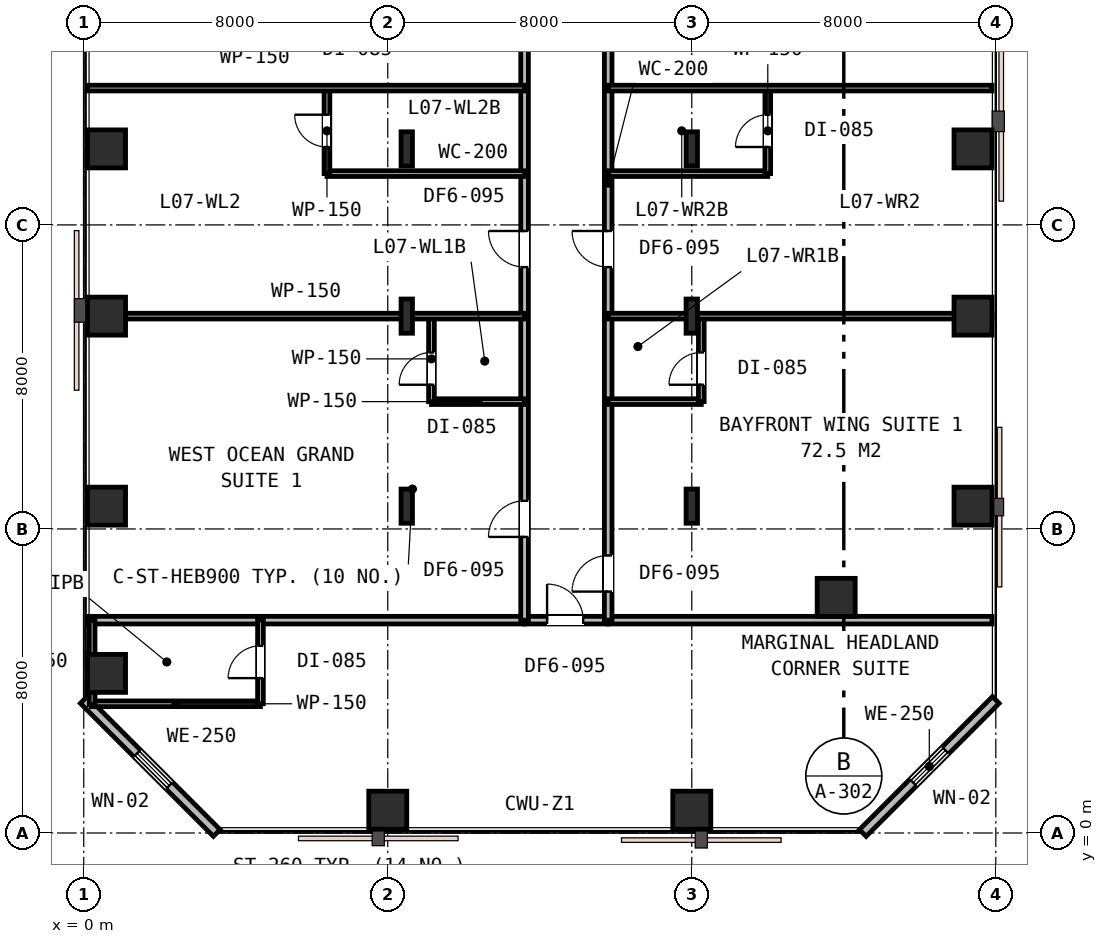
"""IFC4 building model, lengths in metres.
Left out: names, types, materials, properties, quantities, classifications, styles, units other than length and angle.
Written with IfcOpenShell. Run it as: python <this file> out.ifc"""

import sys

from ifc_helpers import new_model, si_unit, direction, frame, frame_2d, origin, origin_2d, place, context, subcontext, project, spatial, rectangle, i_section, extrude, element, fill, save


model = new_model("IFC4")
c1 = context("Model", 3, precision=1e-05, world=origin(), true_north=direction((0.0, 1.0)))
c2 = subcontext(c1, "Body", "Model", "MODEL_VIEW")
j1 = project(units=[si_unit("LENGTHUNIT", "METRE"), si_unit("PLANEANGLEUNIT", "RADIAN")], contexts=[c1])
p1 = place(None, origin())
s1 = spatial("IfcSite", under=j1, at=p1, CompositionType="ELEMENT")
p2 = place(p1, origin())
s2 = spatial("IfcBuilding", under=s1, at=p2, CompositionType="ELEMENT")
p3 = place(p2, frame((0.0, 0.0, 33.0)))
s3 = spatial("IfcBuildingStorey", under=s2, at=p3, CompositionType="ELEMENT", Elevation=33.0)
for number, where, z_axis, x_axis in (
    (1, (0.6, 8.6, 0.0), (0.0, 0.0, 1.0), (1.0, 0.0, 0.0)),
    (2, (0.6, 13.6, 0.0), (0.0, 0.0, 1.0), (1.0, 0.0, 0.0)),
    (3, (0.6, 18.0, 0.0), (0.0, 0.0, 1.0), (1.0, 0.0, 0.0)),
    (4, (0.6, 4.2, 0.0), (0.0, 0.0, 1.0), (1.0, 0.0, 0.0)),
    (5, (8.0, 0.6, 0.0), (0.0, 0.0, 1.0), (1.0, 0.0, 0.0)),
    (6, (16.0, 0.6, 0.0), (0.0, 0.0, 1.0), (1.0, 0.0, 0.0)),
    (7, (19.8, 6.2, 0.0), (0.0, 0.0, 1.0), (1.0, 0.0, 0.0)),
    (8, (23.4, 8.6, 0.0), (0.0, 0.0, 1.0), (1.0, 0.0, 0.0)),
    (9, (23.4, 13.6, 0.0), (0.0, 0.0, 1.0), (1.0, 0.0, 0.0)),
    (10, (23.4, 18.0, 0.0), (0.0, 0.0, 1.0), (1.0, 0.0, 0.0)),
):
    element("IfcColumn", number, at=place(p3, frame(where, z_axis=z_axis, x_axis=x_axis)), inside=s3, PredefinedType="COLUMN", context=c2, shape_type="SweptSolid", body=[
        extrude(rectangle(XDim=1.0, YDim=1.0, at=origin_2d()), origin(), (0.0, 0.0, 1.0), 3.6),
    ])
for number, where, z_axis, x_axis in (
    (11, (8.5, 8.6, 0.0), (0.0, 0.0, 1.0), (1.0, 0.0, 0.0)),
    (12, (16.0, 8.6, 0.0), (0.0, 0.0, 1.0), (1.0, 0.0, 0.0)),
    (13, (8.5, 13.6, 0.0), (0.0, 0.0, 1.0), (1.0, 0.0, 0.0)),
    (14, (16.0, 13.6, 0.0), (0.0, 0.0, 1.0), (1.0, 0.0, 0.0)),
    (15, (8.5, 18.0, 0.0), (0.0, 0.0, 1.0), (1.0, 0.0, 0.0)),
    (16, (16.0, 18.0, 0.0), (0.0, 0.0, 1.0), (1.0, 0.0, 0.0)),
):
    element("IfcColumn", number, at=place(p3, frame(where, z_axis=z_axis, x_axis=x_axis)), inside=s3, PredefinedType="COLUMN", context=c2, shape_type="SweptSolid", body=[
        extrude(i_section(OverallWidth=0.3, OverallDepth=0.9, WebThickness=0.018, FlangeThickness=0.035, FilletRadius=0.03, at=origin_2d()), origin(), (0.0, 0.0, 1.0), 3.6),
    ])
p4 = place(p3, frame((20.5, 0.0, 0.0), z_axis=(0.0, 0.0, 1.0), x_axis=(0.707106781187, 0.707106781187, 0.0)))
e17 = element("IfcWall", 17, at=p4, inside=s3, PredefinedType="STANDARD", context=c2, shape_type="SweptSolid", body=[
    extrude(rectangle(XDim=4.95, YDim=0.25, at=frame_2d((2.475, 0.0))), origin(), (0.0, 0.0, 1.0), 3.33),
])
p5 = place(p4, frame((1.875, 0.0, 0.85)))
e18 = element("IfcOpeningElement", 18, at=p5, cuts=e17, PredefinedType="OPENING", context=c2, shape_type="SweptSolid", body=[
    extrude(rectangle(XDim=1.2, YDim=1.6, at=frame_2d((0.6, 0.8))), frame((0.0, 0.135, 0.0), z_axis=(0.0, -1.0, 0.0), x_axis=(1.0, 0.0, 0.0)), (0.0, 0.0, 1.0), 0.27),
])
p6 = place(p3, frame((0.0, 3.5, 0.0), z_axis=(0.0, 0.0, 1.0), x_axis=(0.707106781187, -0.707106781187, 0.0)))
e19 = element("IfcWall", 19, at=p6, inside=s3, PredefinedType="STANDARD", context=c2, shape_type="SweptSolid", body=[
    extrude(rectangle(XDim=4.95, YDim=0.25, at=frame_2d((2.475, 0.0))), origin(), (0.0, 0.0, 1.0), 3.33),
])
p7 = place(p6, frame((1.985, 0.0, 0.85)))
e20 = element("IfcOpeningElement", 20, at=p7, cuts=e19, PredefinedType="OPENING", context=c2, shape_type="SweptSolid", body=[
    extrude(rectangle(XDim=1.2, YDim=1.6, at=frame_2d((0.6, 0.8))), frame((0.0, 0.135, 0.0), z_axis=(0.0, -1.0, 0.0), x_axis=(1.0, 0.0, 0.0)), (0.0, 0.0, 1.0), 0.27),
])
p8 = place(p3, frame((0.1, 5.6, 0.0), z_axis=(0.0, 0.0, 1.0), x_axis=(1.0, 0.0, 0.0)))
e21 = element("IfcWall", 21, at=p8, inside=s3, PredefinedType="PARTITIONING", context=c2, shape_type="SweptSolid", body=[
    extrude(rectangle(XDim=11.5, YDim=0.2, at=frame_2d((5.75, 0.0))), origin(), (0.0, 0.0, 1.0), 2.87),
])
p9 = place(p3, frame((13.8, 5.6, 0.0), z_axis=(0.0, 0.0, 1.0), x_axis=(1.0, 0.0, 0.0)))
e22 = element("IfcWall", 22, at=p9, inside=s3, PredefinedType="PARTITIONING", context=c2, shape_type="SweptSolid", body=[
    extrude(rectangle(XDim=10.1, YDim=0.2, at=frame_2d((5.05, 0.0))), origin(), (0.0, 0.0, 1.0), 2.68),
])
p10 = place(p3, frame((11.6, 5.6, 0.0), z_axis=(0.0, 0.0, 1.0), x_axis=(1.0, 0.0, 0.0)))
e23 = element("IfcWall", 23, at=p10, inside=s3, PredefinedType="PARTITIONING", context=c2, shape_type="SweptSolid", body=[
    extrude(rectangle(XDim=2.2, YDim=0.2, at=frame_2d((1.1, 0.0))), origin(), (0.0, 0.0, 1.0), 3.33),
])
p11 = place(p10, frame((0.593, 0.0, 0.0)))
e24 = element("IfcOpeningElement", 24, at=p11, cuts=e23, PredefinedType="OPENING", context=c2, shape_type="SweptSolid", body=[
    extrude(rectangle(XDim=0.95, YDim=2.15, at=frame_2d((0.475, 1.075))), frame((0.0, 0.11, 0.0), z_axis=(0.0, -1.0, 0.0), x_axis=(1.0, 0.0, 0.0)), (0.0, 0.0, 1.0), 0.22),
])
p12 = place(p3, frame((0.2, 3.4, 0.0), z_axis=(0.0, 0.0, 1.0), x_axis=(1.0, 0.0, 0.0)))
e25 = element("IfcWall", 25, at=p12, inside=s3, PredefinedType="PARTITIONING", context=c2, shape_type="SweptSolid", body=[
    extrude(rectangle(XDim=4.45, YDim=0.15, at=frame_2d((2.225, 0.0))), origin(), (0.0, 0.0, 1.0), 3.33),
])
p13 = place(p3, frame((4.65, 3.4, 0.0), z_axis=(0.0, 0.0, 1.0), x_axis=(0.0, 1.0, 0.0)))
e26 = element("IfcWall", 26, at=p13, inside=s3, PredefinedType="PARTITIONING", context=c2, shape_type="SweptSolid", body=[
    extrude(rectangle(XDim=2.2, YDim=0.15, at=frame_2d((1.1, 0.0))), origin(), (0.0, 0.0, 1.0), 3.33),
])
p14 = place(p13, frame((0.675, 0.0, 0.0)))
e27 = element("IfcOpeningElement", 27, at=p14, cuts=e26, PredefinedType="OPENING", context=c2, shape_type="SweptSolid", body=[
    extrude(rectangle(XDim=0.85, YDim=2.15, at=frame_2d((0.425, 1.075))), frame((0.0, 0.085, 0.0), z_axis=(0.0, -1.0, 0.0), x_axis=(1.0, 0.0, 0.0)), (0.0, 0.0, 1.0), 0.17),
])
p15 = place(p3, frame((0.22, 3.38, 0.0), z_axis=(0.0, 0.0, 1.0), x_axis=(0.0, 1.0, 0.0)))
e28 = element("IfcWall", 28, at=p15, inside=s3, PredefinedType="PARTITIONING", context=c2, shape_type="SweptSolid", body=[
    extrude(rectangle(XDim=2.22, YDim=0.15, at=frame_2d((1.11, 0.0))), origin(), (0.0, 0.0, 1.0), 2.87),
])
p16 = place(p3, frame((11.6, 5.6, 0.0), z_axis=(0.0, 0.0, 1.0), x_axis=(0.0, 1.0, 0.0)))
e29 = element("IfcWall", 29, at=p16, inside=s3, PredefinedType="PARTITIONING", context=c2, shape_type="SweptSolid", body=[
    extrude(rectangle(XDim=23.0, YDim=0.2, at=frame_2d((11.5, 0.0))), origin(), (0.0, 0.0, 1.0), 2.68),
])
p17 = place(p16, frame((2.19, 0.0, 0.0)))
e30 = element("IfcOpeningElement", 30, at=p17, cuts=e29, PredefinedType="OPENING", context=c2, shape_type="SweptSolid", body=[
    extrude(rectangle(XDim=0.95, YDim=2.15, at=frame_2d((0.475, 1.075))), frame((0.0, 0.11, 0.0), z_axis=(0.0, -1.0, 0.0), x_axis=(1.0, 0.0, 0.0)), (0.0, 0.0, 1.0), 0.22),
])
p18 = place(p16, frame((9.29, 0.0, 0.0)))
e31 = element("IfcOpeningElement", 31, at=p18, cuts=e29, PredefinedType="OPENING", context=c2, shape_type="SweptSolid", body=[
    extrude(rectangle(XDim=0.95, YDim=2.15, at=frame_2d((0.475, 1.075))), frame((0.0, 0.11, 0.0), z_axis=(0.0, -1.0, 0.0), x_axis=(1.0, 0.0, 0.0)), (0.0, 0.0, 1.0), 0.22),
])
p19 = place(p16, frame((16.64, 0.0, 0.0)))
e32 = element("IfcOpeningElement", 32, at=p19, cuts=e29, PredefinedType="OPENING", context=c2, shape_type="SweptSolid", body=[
    extrude(rectangle(XDim=0.95, YDim=2.15, at=frame_2d((0.475, 1.075))), frame((0.0, 0.11, 0.0), z_axis=(0.0, -1.0, 0.0), x_axis=(1.0, 0.0, 0.0)), (0.0, 0.0, 1.0), 0.22),
])
p20 = place(p3, frame((9.15, 11.35, 0.0), z_axis=(0.0, 0.0, 1.0), x_axis=(1.0, 0.0, 0.0)))
e33 = element("IfcWall", 33, at=p20, inside=s3, PredefinedType="PARTITIONING", context=c2, shape_type="SweptSolid", body=[
    extrude(rectangle(XDim=2.45, YDim=0.15, at=frame_2d((1.225, 0.0))), origin(), (0.0, 0.0, 1.0), 2.92),
])
p21 = place(p3, frame((9.15, 11.35, 0.0), z_axis=(0.0, 0.0, 1.0), x_axis=(0.0, 1.0, 0.0)))
e34 = element("IfcWall", 34, at=p21, inside=s3, PredefinedType="PARTITIONING", context=c2, shape_type="SweptSolid", body=[
    extrude(rectangle(XDim=2.25, YDim=0.15, at=frame_2d((1.125, 0.0))), origin(), (0.0, 0.0, 1.0), 2.68),
])
p22 = place(p21, frame((0.444, 0.0, 0.0)))
e35 = element("IfcOpeningElement", 35, at=p22, cuts=e34, PredefinedType="OPENING", context=c2, shape_type="SweptSolid", body=[
    extrude(rectangle(XDim=0.85, YDim=2.15, at=frame_2d((0.425, 1.075))), frame((0.0, 0.085, 0.0), z_axis=(0.0, -1.0, 0.0), x_axis=(1.0, 0.0, 0.0)), (0.0, 0.0, 1.0), 0.17),
])
p23 = place(p3, frame((0.1, 13.6, 0.0), z_axis=(0.0, 0.0, 1.0), x_axis=(1.0, 0.0, 0.0)))
e36 = element("IfcWall", 36, at=p23, inside=s3, PredefinedType="PARTITIONING", context=c2, shape_type="SweptSolid", body=[
    extrude(rectangle(XDim=11.5, YDim=0.15, at=frame_2d((5.75, 0.0))), origin(), (0.0, 0.0, 1.0), 2.68),
])
p24 = place(p3, frame((13.8, 5.6, 0.0), z_axis=(0.0, 0.0, 1.0), x_axis=(0.0, 1.0, 0.0)))
e37 = element("IfcWall", 37, at=p24, inside=s3, PredefinedType="PARTITIONING", context=c2, shape_type="SweptSolid", body=[
    extrude(rectangle(XDim=23.0, YDim=0.2, at=frame_2d((11.5, 0.0))), origin(), (0.0, 0.0, 1.0), 2.68),
])
p25 = place(p24, frame((0.752, 0.0, 0.0)))
e38 = element("IfcOpeningElement", 38, at=p25, cuts=e37, PredefinedType="OPENING", context=c2, shape_type="SweptSolid", body=[
    extrude(rectangle(XDim=0.95, YDim=2.15, at=frame_2d((0.475, 1.075))), frame((0.0, 0.11, 0.0), z_axis=(0.0, -1.0, 0.0), x_axis=(1.0, 0.0, 0.0)), (0.0, 0.0, 1.0), 0.22),
])
p26 = place(p24, frame((9.29, 0.0, 0.0)))
e39 = element("IfcOpeningElement", 39, at=p26, cuts=e37, PredefinedType="OPENING", context=c2, shape_type="SweptSolid", body=[
    extrude(rectangle(XDim=0.95, YDim=2.15, at=frame_2d((0.475, 1.075))), frame((0.0, 0.11, 0.0), z_axis=(0.0, -1.0, 0.0), x_axis=(1.0, 0.0, 0.0)), (0.0, 0.0, 1.0), 0.22),
])
p27 = place(p24, frame((16.494, 0.0, 0.0)))
e40 = element("IfcOpeningElement", 40, at=p27, cuts=e37, PredefinedType="OPENING", context=c2, shape_type="SweptSolid", body=[
    extrude(rectangle(XDim=0.95, YDim=2.15, at=frame_2d((0.475, 1.075))), frame((0.0, 0.11, 0.0), z_axis=(0.0, -1.0, 0.0), x_axis=(1.0, 0.0, 0.0)), (0.0, 0.0, 1.0), 0.22),
])
p28 = place(p3, frame((13.8, 11.35, 0.0), z_axis=(0.0, 0.0, 1.0), x_axis=(1.0, 0.0, 0.0)))
e41 = element("IfcWall", 41, at=p28, inside=s3, PredefinedType="PARTITIONING", context=c2, shape_type="SweptSolid", body=[
    extrude(rectangle(XDim=2.45, YDim=0.15, at=frame_2d((1.225, 0.0))), origin(), (0.0, 0.0, 1.0), 2.68),
])
p29 = place(p3, frame((16.25, 11.35, 0.0), z_axis=(0.0, 0.0, 1.0), x_axis=(0.0, 1.0, 0.0)))
e42 = element("IfcWall", 42, at=p29, inside=s3, PredefinedType="PARTITIONING", context=c2, shape_type="SweptSolid", body=[
    extrude(rectangle(XDim=2.25, YDim=0.15, at=frame_2d((1.125, 0.0))), origin(), (0.0, 0.0, 1.0), 2.68),
])
p30 = place(p29, frame((0.444, 0.0, 0.0)))
e43 = element("IfcOpeningElement", 43, at=p30, cuts=e42, PredefinedType="OPENING", context=c2, shape_type="SweptSolid", body=[
    extrude(rectangle(XDim=0.85, YDim=2.15, at=frame_2d((0.425, 1.075))), frame((0.0, 0.085, 0.0), z_axis=(0.0, -1.0, 0.0), x_axis=(1.0, 0.0, 0.0)), (0.0, 0.0, 1.0), 0.17),
])
p31 = place(p3, frame((13.8, 13.6, 0.0), z_axis=(0.0, 0.0, 1.0), x_axis=(1.0, 0.0, 0.0)))
e44 = element("IfcWall", 44, at=p31, inside=s3, PredefinedType="PARTITIONING", context=c2, shape_type="SweptSolid", body=[
    extrude(rectangle(XDim=10.1, YDim=0.15, at=frame_2d((5.05, 0.0))), origin(), (0.0, 0.0, 1.0), 2.68),
])
p32 = place(p3, frame((6.4, 17.35, 0.0), z_axis=(0.0, 0.0, 1.0), x_axis=(1.0, 0.0, 0.0)))
e45 = element("IfcWall", 45, at=p32, inside=s3, PredefinedType="PARTITIONING", context=c2, shape_type="SweptSolid", body=[
    extrude(rectangle(XDim=5.2, YDim=0.15, at=frame_2d((2.6, 0.0))), origin(), (0.0, 0.0, 1.0), 2.68),
])
p33 = place(p3, frame((6.4, 17.35, 0.0), z_axis=(0.0, 0.0, 1.0), x_axis=(0.0, 1.0, 0.0)))
e46 = element("IfcWall", 46, at=p33, inside=s3, PredefinedType="PARTITIONING", context=c2, shape_type="SweptSolid", body=[
    extrude(rectangle(XDim=2.25, YDim=0.15, at=frame_2d((1.125, 0.0))), origin(), (0.0, 0.0, 1.0), 2.68),
])
p34 = place(p33, frame((0.7, 0.0, 0.0)))
e47 = element("IfcOpeningElement", 47, at=p34, cuts=e46, PredefinedType="OPENING", context=c2, shape_type="SweptSolid", body=[
    extrude(rectangle(XDim=0.85, YDim=2.15, at=frame_2d((0.425, 1.075))), frame((0.0, 0.085, 0.0), z_axis=(0.0, -1.0, 0.0), x_axis=(1.0, 0.0, 0.0)), (0.0, 0.0, 1.0), 0.17),
])
p35 = place(p3, frame((0.1, 19.6, 0.0), z_axis=(0.0, 0.0, 1.0), x_axis=(1.0, 0.0, 0.0)))
e48 = element("IfcWall", 48, at=p35, inside=s3, PredefinedType="PARTITIONING", context=c2, shape_type="SweptSolid", body=[
    extrude(rectangle(XDim=11.5, YDim=0.15, at=frame_2d((5.75, 0.0))), origin(), (0.0, 0.0, 1.0), 2.68),
])
p36 = place(p3, frame((13.8, 17.35, 0.0), z_axis=(0.0, 0.0, 1.0), x_axis=(1.0, 0.0, 0.0)))
e49 = element("IfcWall", 49, at=p36, inside=s3, PredefinedType="PARTITIONING", context=c2, shape_type="SweptSolid", body=[
    extrude(rectangle(XDim=4.2, YDim=0.15, at=frame_2d((2.1, 0.0))), origin(), (0.0, 0.0, 1.0), 2.68),
])
p37 = place(p3, frame((18.0, 17.35, 0.0), z_axis=(0.0, 0.0, 1.0), x_axis=(0.0, 1.0, 0.0)))
e50 = element("IfcWall", 50, at=p37, inside=s3, PredefinedType="PARTITIONING", context=c2, shape_type="SweptSolid", body=[
    extrude(rectangle(XDim=2.25, YDim=0.15, at=frame_2d((1.125, 0.0))), origin(), (0.0, 0.0, 1.0), 2.68),
])
p38 = place(p37, frame((0.7, 0.0, 0.0)))
e51 = element("IfcOpeningElement", 51, at=p38, cuts=e50, PredefinedType="OPENING", context=c2, shape_type="SweptSolid", body=[
    extrude(rectangle(XDim=0.85, YDim=2.15, at=frame_2d((0.425, 1.075))), frame((0.0, 0.085, 0.0), z_axis=(0.0, -1.0, 0.0), x_axis=(1.0, 0.0, 0.0)), (0.0, 0.0, 1.0), 0.17),
])
p39 = place(p3, frame((13.8, 19.6, 0.0), z_axis=(0.0, 0.0, 1.0), x_axis=(1.0, 0.0, 0.0)))
e52 = element("IfcWall", 52, at=p39, inside=s3, PredefinedType="PARTITIONING", context=c2, shape_type="SweptSolid", body=[
    extrude(rectangle(XDim=10.1, YDim=0.15, at=frame_2d((5.05, 0.0))), origin(), (0.0, 0.0, 1.0), 2.68),
])
p40 = place(p5, origin())
e53 = element("IfcWindow", 53, at=p40, inside=s3, PartitioningType="SINGLE_PANEL", PredefinedType="WINDOW", context=c2, shape_type="SweptSolid", body=[
    extrude(rectangle(XDim=1.2, YDim=1.6, at=frame_2d((0.6, 0.8))), frame((0.0, 0.03, 0.0), z_axis=(0.0, -1.0, 0.0), x_axis=(1.0, 0.0, 0.0)), (0.0, 0.0, 1.0), 0.06),
])
fill(e18, e53)
p41 = place(p7, origin())
e54 = element("IfcWindow", 54, at=p41, inside=s3, PartitioningType="SINGLE_PANEL", PredefinedType="WINDOW", context=c2, shape_type="SweptSolid", body=[
    extrude(rectangle(XDim=1.2, YDim=1.6, at=frame_2d((0.6, 0.8))), frame((0.0, 0.03, 0.0), z_axis=(0.0, -1.0, 0.0), x_axis=(1.0, 0.0, 0.0)), (0.0, 0.0, 1.0), 0.06),
])
fill(e20, e54)
p42 = place(p11, origin())
e55 = element("IfcDoor", 55, at=p42, inside=s3, OperationType="SINGLE_SWING_LEFT", PredefinedType="DOOR", context=c2, shape_type="SweptSolid", body=[
    extrude(rectangle(XDim=0.95, YDim=2.15, at=frame_2d((0.475, 1.075))), frame((0.0, 0.025, 0.0), z_axis=(0.0, -1.0, 0.0), x_axis=(1.0, 0.0, 0.0)), (0.0, 0.0, 1.0), 0.05),
])
fill(e24, e55)
p43 = place(p14, origin())
e56 = element("IfcDoor", 56, at=p43, inside=s3, OperationType="SINGLE_SWING_LEFT", PredefinedType="DOOR", context=c2, shape_type="SweptSolid", body=[
    extrude(rectangle(XDim=0.85, YDim=2.15, at=frame_2d((0.425, 1.075))), frame((0.0, 0.025, 0.0), z_axis=(0.0, -1.0, 0.0), x_axis=(1.0, 0.0, 0.0)), (0.0, 0.0, 1.0), 0.05),
])
fill(e27, e56)
p44 = place(p17, origin())
e57 = element("IfcDoor", 57, at=p44, inside=s3, OperationType="SINGLE_SWING_LEFT", PredefinedType="DOOR", context=c2, shape_type="SweptSolid", body=[
    extrude(rectangle(XDim=0.95, YDim=2.15, at=frame_2d((0.475, 1.075))), frame((0.0, 0.025, 0.0), z_axis=(0.0, -1.0, 0.0), x_axis=(1.0, 0.0, 0.0)), (0.0, 0.0, 1.0), 0.05),
])
fill(e30, e57)
p45 = place(p22, origin())
e58 = element("IfcDoor", 58, at=p45, inside=s3, OperationType="SINGLE_SWING_LEFT", PredefinedType="DOOR", context=c2, shape_type="SweptSolid", body=[
    extrude(rectangle(XDim=0.85, YDim=2.15, at=frame_2d((0.425, 1.075))), frame((0.0, 0.025, 0.0), z_axis=(0.0, -1.0, 0.0), x_axis=(1.0, 0.0, 0.0)), (0.0, 0.0, 1.0), 0.05),
])
fill(e35, e58)
p46 = place(p25, origin())
e59 = element("IfcDoor", 59, at=p46, inside=s3, OperationType="SINGLE_SWING_LEFT", PredefinedType="DOOR", context=c2, shape_type="SweptSolid", body=[
    extrude(rectangle(XDim=0.95, YDim=2.15, at=frame_2d((0.475, 1.075))), frame((0.0, 0.025, 0.0), z_axis=(0.0, -1.0, 0.0), x_axis=(1.0, 0.0, 0.0)), (0.0, 0.0, 1.0), 0.05),
])
fill(e38, e59)
p47 = place(p30, origin())
e60 = element("IfcDoor", 60, at=p47, inside=s3, OperationType="SINGLE_SWING_LEFT", PredefinedType="DOOR", context=c2, shape_type="SweptSolid", body=[
    extrude(rectangle(XDim=0.85, YDim=2.15, at=frame_2d((0.425, 1.075))), frame((0.0, 0.025, 0.0), z_axis=(0.0, -1.0, 0.0), x_axis=(1.0, 0.0, 0.0)), (0.0, 0.0, 1.0), 0.05),
])
fill(e43, e60)
p48 = place(p18, origin())
e61 = element("IfcDoor", 61, at=p48, inside=s3, OperationType="SINGLE_SWING_RIGHT", PredefinedType="DOOR", context=c2, shape_type="SweptSolid", body=[
    extrude(rectangle(XDim=0.95, YDim=2.15, at=frame_2d((0.475, 1.075))), frame((0.0, 0.025, 0.0), z_axis=(0.0, -1.0, 0.0), x_axis=(1.0, 0.0, 0.0)), (0.0, 0.0, 1.0), 0.05),
])
fill(e31, e61)
p49 = place(p34, origin())
e62 = element("IfcDoor", 62, at=p49, inside=s3, OperationType="SINGLE_SWING_RIGHT", PredefinedType="DOOR", context=c2, shape_type="SweptSolid", body=[
    extrude(rectangle(XDim=0.85, YDim=2.15, at=frame_2d((0.425, 1.075))), frame((0.0, 0.025, 0.0), z_axis=(0.0, -1.0, 0.0), x_axis=(1.0, 0.0, 0.0)), (0.0, 0.0, 1.0), 0.05),
])
fill(e47, e62)
p50 = place(p26, origin())
e63 = element("IfcDoor", 63, at=p50, inside=s3, OperationType="SINGLE_SWING_RIGHT", PredefinedType="DOOR", context=c2, shape_type="SweptSolid", body=[
    extrude(rectangle(XDim=0.95, YDim=2.15, at=frame_2d((0.475, 1.075))), frame((0.0, 0.025, 0.0), z_axis=(0.0, -1.0, 0.0), x_axis=(1.0, 0.0, 0.0)), (0.0, 0.0, 1.0), 0.05),
])
fill(e39, e63)
p51 = place(p38, origin())
e64 = element("IfcDoor", 64, at=p51, inside=s3, OperationType="SINGLE_SWING_LEFT", PredefinedType="DOOR", context=c2, shape_type="SweptSolid", body=[
    extrude(rectangle(XDim=0.85, YDim=2.15, at=frame_2d((0.425, 1.075))), frame((0.0, 0.025, 0.0), z_axis=(0.0, -1.0, 0.0), x_axis=(1.0, 0.0, 0.0)), (0.0, 0.0, 1.0), 0.05),
])
fill(e51, e64)
save(model, sys.argv[1])
